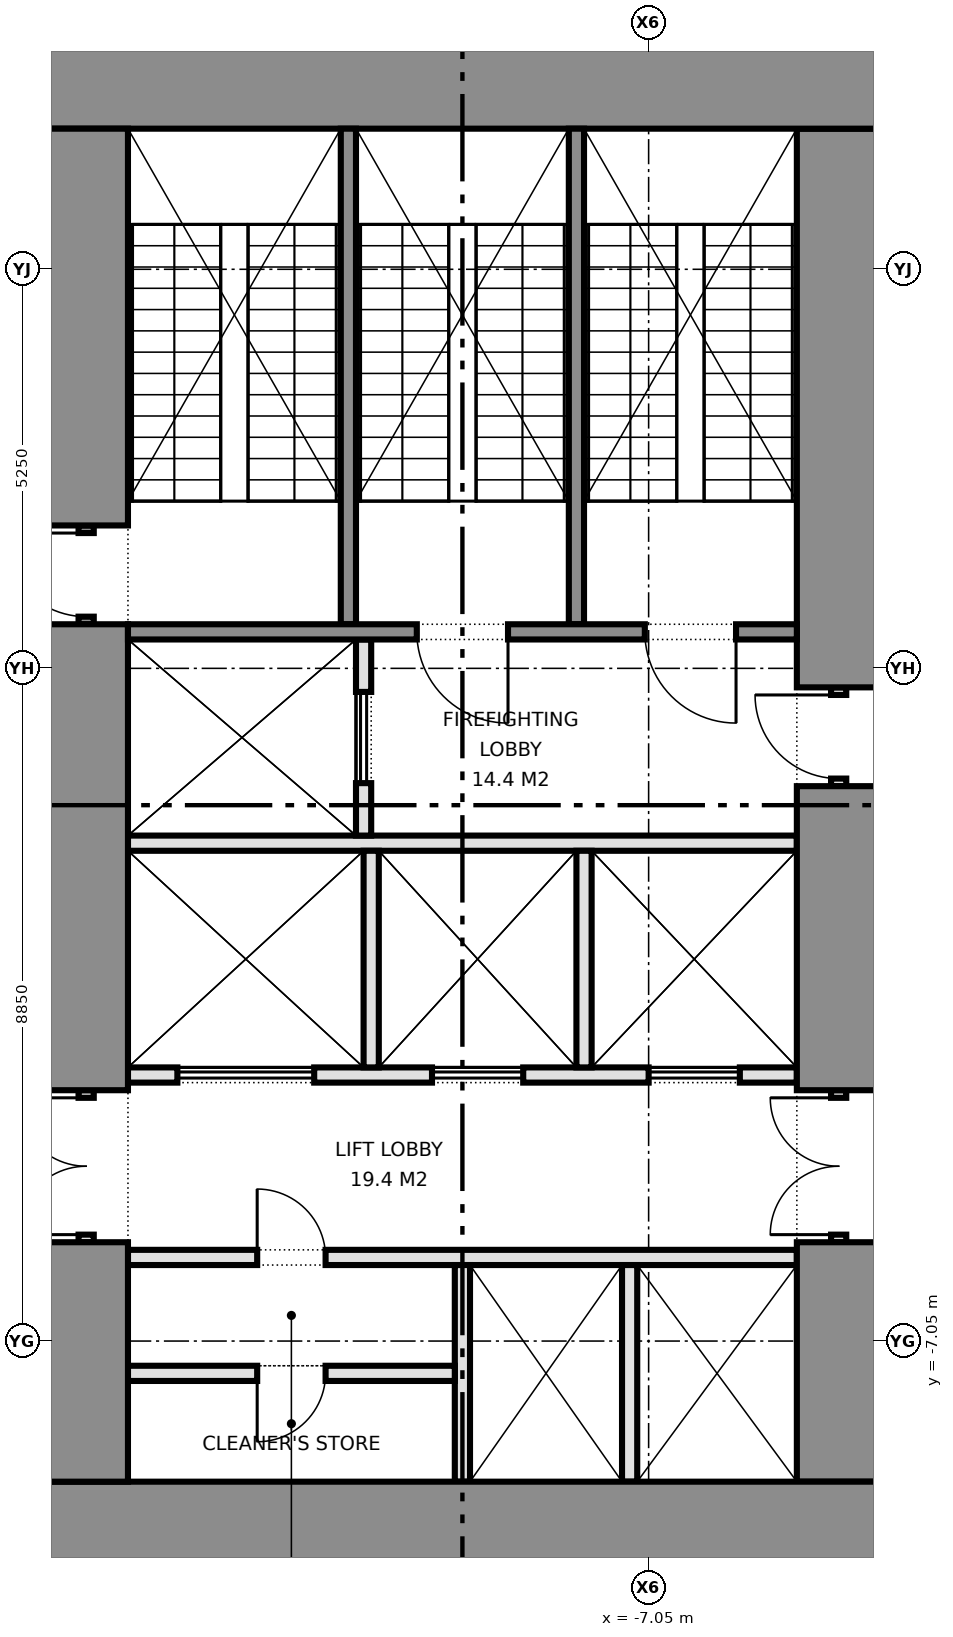
"""IFC4 building model, lengths in metres.
Left out: names, types, materials, properties, quantities, classifications, styles, units other than length and angle.
Written with IfcOpenShell. Run it as: python <this file> out.ifc"""

import sys

from ifc_helpers import new_model, si_unit, direction, frame, frame_2d, origin, place, context, subcontext, project, spatial, rectangle, extrude, element, fill, save


model = new_model("IFC4")
c1 = context("Model", 3, precision=1e-05, world=origin(), true_north=direction((0.0, 1.0)))
c2 = subcontext(c1, "Body", "Model", "MODEL_VIEW")
j1 = project(units=[si_unit("LENGTHUNIT", "METRE"), si_unit("PLANEANGLEUNIT", "RADIAN")], contexts=[c1])
p1 = place(None, origin())
s1 = spatial("IfcSite", under=j1, at=p1, CompositionType="ELEMENT")
p2 = place(p1, origin())
s2 = spatial("IfcBuilding", under=s1, at=p2, CompositionType="ELEMENT")
p3 = place(p2, frame((0.0, 0.0, 35.3)))
s3 = spatial("IfcBuildingStorey", under=s2, at=p3, CompositionType="ELEMENT", Elevation=35.3)
for number, where, z_axis, x_axis in (
    (1, (-15.0, -9.45, 0.0), (0.0, 0.0, 1.0), (1.0, 0.0, 0.0)),
    (2, (-15.0, 9.45, 0.0), (0.0, 0.0, 1.0), (1.0, 0.0, 0.0)),
):
    element("IfcWall", number, at=place(p3, frame(where, z_axis=z_axis, x_axis=x_axis)), inside=s3, PredefinedType="SHEAR", context=c2, shape_type="SweptSolid", body=[
        extrude(rectangle(XDim=11.0, YDim=1.1, at=frame_2d((5.5, 0.0))), origin(), (0.0, 0.0, 1.0), 4.575),
    ])
p4 = place(p3, frame((-14.45, -8.9, 0.0), z_axis=(0.0, 0.0, 1.0), x_axis=(0.0, 1.0, 0.0)))
e3 = element("IfcWall", 3, at=p4, inside=s3, PredefinedType="SHEAR", context=c2, shape_type="SweptSolid", body=[
    extrude(rectangle(XDim=3.15, YDim=1.1, at=frame_2d((1.575, 0.0))), origin(), (0.0, 0.0, 1.0), 4.575),
])
p5 = place(p3, frame((-14.45, -5.75, 0.0), z_axis=(0.0, 0.0, 1.0), x_axis=(0.0, 1.0, 0.0)))
e4 = element("IfcWall", 4, at=p5, inside=s3, PredefinedType="PARTITIONING", context=c2, shape_type="SweptSolid", body=[
    extrude(rectangle(XDim=2.0, YDim=0.2, at=frame_2d((1.0, 0.0))), origin(), (0.0, 0.0, 1.0), 2.4),
])
p6 = place(p5, frame((0.1, 0.0, 0.0)))
e5 = element("IfcOpeningElement", 5, at=p6, cuts=e4, PredefinedType="OPENING", context=c2, shape_type="SweptSolid", body=[
    extrude(rectangle(XDim=1.8, YDim=2.1, at=frame_2d((0.9, 1.05))), frame((0.0, 0.11, 0.0), z_axis=(0.0, -1.0, 0.0), x_axis=(1.0, 0.0, 0.0)), (0.0, 0.0, 1.0), 0.22),
])
p7 = place(p3, frame((-14.45, -3.75, 0.0), z_axis=(0.0, 0.0, 1.0), x_axis=(0.0, 1.0, 0.0)))
e6 = element("IfcWall", 6, at=p7, inside=s3, PredefinedType="SHEAR", context=c2, shape_type="SweptSolid", body=[
    extrude(rectangle(XDim=6.13, YDim=1.1, at=frame_2d((3.065, 0.0))), origin(), (0.0, 0.0, 1.0), 4.575),
])
p8 = place(p3, frame((-14.45, 2.38, 0.0), z_axis=(0.0, 0.0, 1.0), x_axis=(0.0, 1.0, 0.0)))
e7 = element("IfcWall", 7, at=p8, inside=s3, PredefinedType="SHEAR", context=c2, shape_type="SweptSolid", body=[
    extrude(rectangle(XDim=1.3, YDim=0.2, at=frame_2d((0.65, 0.0))), origin(), (0.0, 0.0, 1.0), 2.4),
])
p9 = place(p8, frame((0.1, 0.0, 0.0)))
e8 = element("IfcOpeningElement", 8, at=p9, cuts=e7, PredefinedType="OPENING", context=c2, shape_type="SweptSolid", body=[
    extrude(rectangle(XDim=1.1, YDim=2.1, at=frame_2d((0.55, 1.05))), frame((0.0, 0.11, 0.0), z_axis=(0.0, -1.0, 0.0), x_axis=(1.0, 0.0, 0.0)), (0.0, 0.0, 1.0), 0.22),
])
p10 = place(p3, frame((-14.45, 3.68, 0.0), z_axis=(0.0, 0.0, 1.0), x_axis=(0.0, 1.0, 0.0)))
e9 = element("IfcWall", 9, at=p10, inside=s3, PredefinedType="SHEAR", context=c2, shape_type="SweptSolid", body=[
    extrude(rectangle(XDim=5.22, YDim=1.1, at=frame_2d((2.61, 0.0))), origin(), (0.0, 0.0, 1.0), 4.575),
])
p11 = place(p3, frame((-4.55, -8.9, 0.0), z_axis=(0.0, 0.0, 1.0), x_axis=(0.0, 1.0, 0.0)))
e10 = element("IfcWall", 10, at=p11, inside=s3, PredefinedType="SHEAR", context=c2, shape_type="SweptSolid", body=[
    extrude(rectangle(XDim=3.15, YDim=1.1, at=frame_2d((1.575, 0.0))), origin(), (0.0, 0.0, 1.0), 4.575),
])
p12 = place(p3, frame((-4.55, -5.75, 0.0), z_axis=(0.0, 0.0, 1.0), x_axis=(0.0, 1.0, 0.0)))
e11 = element("IfcWall", 11, at=p12, inside=s3, PredefinedType="PARTITIONING", context=c2, shape_type="SweptSolid", body=[
    extrude(rectangle(XDim=2.0, YDim=0.2, at=frame_2d((1.0, 0.0))), origin(), (0.0, 0.0, 1.0), 2.4),
])
p13 = place(p12, frame((0.1, 0.0, 0.0)))
e12 = element("IfcOpeningElement", 12, at=p13, cuts=e11, PredefinedType="OPENING", context=c2, shape_type="SweptSolid", body=[
    extrude(rectangle(XDim=1.8, YDim=2.1, at=frame_2d((0.9, 1.05))), frame((0.0, 0.11, 0.0), z_axis=(0.0, -1.0, 0.0), x_axis=(1.0, 0.0, 0.0)), (0.0, 0.0, 1.0), 0.22),
])
p14 = place(p3, frame((-4.55, -3.75, 0.0), z_axis=(0.0, 0.0, 1.0), x_axis=(0.0, 1.0, 0.0)))
e13 = element("IfcWall", 13, at=p14, inside=s3, PredefinedType="SHEAR", context=c2, shape_type="SweptSolid", body=[
    extrude(rectangle(XDim=4.0, YDim=1.1, at=frame_2d((2.0, 0.0))), origin(), (0.0, 0.0, 1.0), 4.575),
])
p15 = place(p3, frame((-4.55, 0.25, 0.0), z_axis=(0.0, 0.0, 1.0), x_axis=(0.0, 1.0, 0.0)))
e14 = element("IfcWall", 14, at=p15, inside=s3, PredefinedType="PARTITIONING", context=c2, shape_type="SweptSolid", body=[
    extrude(rectangle(XDim=1.3, YDim=0.2, at=frame_2d((0.65, 0.0))), origin(), (0.0, 0.0, 1.0), 2.4),
])
p16 = place(p15, frame((0.1, 0.0, 0.0)))
e15 = element("IfcOpeningElement", 15, at=p16, cuts=e14, PredefinedType="OPENING", context=c2, shape_type="SweptSolid", body=[
    extrude(rectangle(XDim=1.1, YDim=2.1, at=frame_2d((0.55, 1.05))), frame((0.0, 0.11, 0.0), z_axis=(0.0, -1.0, 0.0), x_axis=(1.0, 0.0, 0.0)), (0.0, 0.0, 1.0), 0.22),
])
p17 = place(p3, frame((-4.55, 1.55, 0.0), z_axis=(0.0, 0.0, 1.0), x_axis=(0.0, 1.0, 0.0)))
e16 = element("IfcWall", 16, at=p17, inside=s3, PredefinedType="SHEAR", context=c2, shape_type="SweptSolid", body=[
    extrude(rectangle(XDim=7.35, YDim=1.1, at=frame_2d((3.675, 0.0))), origin(), (0.0, 0.0, 1.0), 4.575),
])
p18 = place(p3, frame((-13.9, -5.95, 0.0), z_axis=(0.0, 0.0, 1.0), x_axis=(1.0, 0.0, 0.0)))
e17 = element("IfcWall", 17, at=p18, inside=s3, PredefinedType="PARTITIONING", context=c2, shape_type="SweptSolid", body=[
    extrude(rectangle(XDim=8.8, YDim=0.2, at=frame_2d((4.4, 0.0))), origin(), (0.0, 0.0, 1.0), 4.575),
])
p19 = place(p18, frame((1.7, 0.0, 0.0)))
e18 = element("IfcOpeningElement", 18, at=p19, cuts=e17, PredefinedType="OPENING", context=c2, shape_type="SweptSolid", body=[
    extrude(rectangle(XDim=0.9, YDim=2.1, at=frame_2d((0.45, 1.05))), frame((0.0, 0.11, 0.0), z_axis=(0.0, -1.0, 0.0), x_axis=(1.0, 0.0, 0.0)), (0.0, 0.0, 1.0), 0.22),
])
p20 = place(p3, frame((-13.9, -3.55, 0.0), z_axis=(0.0, 0.0, 1.0), x_axis=(1.0, 0.0, 0.0)))
e19 = element("IfcWall", 19, at=p20, inside=s3, PredefinedType="PARTITIONING", context=c2, shape_type="SweptSolid", body=[
    extrude(rectangle(XDim=8.8, YDim=0.2, at=frame_2d((4.4, 0.0))), origin(), (0.0, 0.0, 1.0), 4.575),
])
p21 = place(p20, frame((0.65, 0.0, 0.0)))
e20 = element("IfcOpeningElement", 20, at=p21, cuts=e19, PredefinedType="OPENING", context=c2, shape_type="SweptSolid", body=[
    extrude(rectangle(XDim=1.8, YDim=2.1, at=frame_2d((0.9, 1.05))), frame((0.0, 0.11, 0.0), z_axis=(0.0, -1.0, 0.0), x_axis=(1.0, 0.0, 0.0)), (0.0, 0.0, 1.0), 0.22),
])
p22 = place(p20, frame((4.0, 0.0, 0.0)))
e21 = element("IfcOpeningElement", 21, at=p22, cuts=e19, PredefinedType="OPENING", context=c2, shape_type="SweptSolid", body=[
    extrude(rectangle(XDim=1.2, YDim=2.1, at=frame_2d((0.6, 1.05))), frame((0.0, 0.11, 0.0), z_axis=(0.0, -1.0, 0.0), x_axis=(1.0, 0.0, 0.0)), (0.0, 0.0, 1.0), 0.22),
])
p23 = place(p20, frame((6.85, 0.0, 0.0)))
e22 = element("IfcOpeningElement", 22, at=p23, cuts=e19, PredefinedType="OPENING", context=c2, shape_type="SweptSolid", body=[
    extrude(rectangle(XDim=1.2, YDim=2.1, at=frame_2d((0.6, 1.05))), frame((0.0, 0.11, 0.0), z_axis=(0.0, -1.0, 0.0), x_axis=(1.0, 0.0, 0.0)), (0.0, 0.0, 1.0), 0.22),
])
p24 = place(p3, frame((-13.9, -0.5, 0.0), z_axis=(0.0, 0.0, 1.0), x_axis=(1.0, 0.0, 0.0)))
e23 = element("IfcWall", 23, at=p24, inside=s3, PredefinedType="PARTITIONING", context=c2, shape_type="SweptSolid", body=[
    extrude(rectangle(XDim=8.8, YDim=0.2, at=frame_2d((4.4, 0.0))), origin(), (0.0, 0.0, 1.0), 4.575),
])
p25 = place(p3, frame((-10.8, -0.4, 0.0), z_axis=(0.0, 0.0, 1.0), x_axis=(0.0, 1.0, 0.0)))
e24 = element("IfcWall", 24, at=p25, inside=s3, PredefinedType="PARTITIONING", context=c2, shape_type="SweptSolid", body=[
    extrude(rectangle(XDim=2.58, YDim=0.2, at=frame_2d((1.29, 0.0))), origin(), (0.0, 0.0, 1.0), 4.575),
])
p26 = place(p25, frame((0.69, 0.0, 0.0)))
e25 = element("IfcOpeningElement", 25, at=p26, cuts=e24, PredefinedType="OPENING", context=c2, shape_type="SweptSolid", body=[
    extrude(rectangle(XDim=1.2, YDim=2.1, at=frame_2d((0.6, 1.05))), frame((0.0, 0.11, 0.0), z_axis=(0.0, -1.0, 0.0), x_axis=(1.0, 0.0, 0.0)), (0.0, 0.0, 1.0), 0.22),
])
p27 = place(p3, frame((-13.9, 2.28, 0.0), z_axis=(0.0, 0.0, 1.0), x_axis=(1.0, 0.0, 0.0)))
e26 = element("IfcWall", 26, at=p27, inside=s3, PredefinedType="SHEAR", context=c2, shape_type="SweptSolid", body=[
    extrude(rectangle(XDim=8.8, YDim=0.2, at=frame_2d((4.4, 0.0))), origin(), (0.0, 0.0, 1.0), 4.575),
])
p28 = place(p27, frame((3.8, 0.0, 0.0)))
e27 = element("IfcOpeningElement", 27, at=p28, cuts=e26, PredefinedType="OPENING", context=c2, shape_type="SweptSolid", body=[
    extrude(rectangle(XDim=1.2, YDim=2.1, at=frame_2d((0.6, 1.05))), frame((0.0, 0.11, 0.0), z_axis=(0.0, -1.0, 0.0), x_axis=(1.0, 0.0, 0.0)), (0.0, 0.0, 1.0), 0.22),
])
p29 = place(p27, frame((6.8, 0.0, 0.0)))
e28 = element("IfcOpeningElement", 28, at=p29, cuts=e26, PredefinedType="OPENING", context=c2, shape_type="SweptSolid", body=[
    extrude(rectangle(XDim=1.2, YDim=2.1, at=frame_2d((0.6, 1.05))), frame((0.0, 0.11, 0.0), z_axis=(0.0, -1.0, 0.0), x_axis=(1.0, 0.0, 0.0)), (0.0, 0.0, 1.0), 0.22),
])
for number, where, z_axis, x_axis in (
    (29, (-11.0, 2.38, 0.0), (0.0, 0.0, 1.0), (0.0, 1.0, 0.0)),
    (30, (-8.0, 2.38, 0.0), (0.0, 0.0, 1.0), (0.0, 1.0, 0.0)),
):
    element("IfcWall", number, at=place(p3, frame(where, z_axis=z_axis, x_axis=x_axis)), inside=s3, PredefinedType="SHEAR", context=c2, shape_type="SweptSolid", body=[
        extrude(rectangle(XDim=6.52, YDim=0.2, at=frame_2d((3.26, 0.0))), origin(), (0.0, 0.0, 1.0), 4.575),
    ])
for number, where, z_axis, x_axis in (
    (31, (-9.5, -8.9, 0.0), (0.0, 0.0, 1.0), (0.0, 1.0, 0.0)),
    (32, (-7.3, -8.9, 0.0), (0.0, 0.0, 1.0), (0.0, 1.0, 0.0)),
):
    element("IfcWall", number, at=place(p3, frame(where, z_axis=z_axis, x_axis=x_axis)), inside=s3, PredefinedType="PARTITIONING", context=c2, shape_type="SweptSolid", body=[
        extrude(rectangle(XDim=2.85, YDim=0.2, at=frame_2d((1.425, 0.0))), origin(), (0.0, 0.0, 1.0), 4.575),
    ])
p30 = place(p3, frame((-13.9, -7.475, 0.0), z_axis=(0.0, 0.0, 1.0), x_axis=(1.0, 0.0, 0.0)))
e33 = element("IfcWall", 33, at=p30, inside=s3, PredefinedType="PARTITIONING", context=c2, shape_type="SweptSolid", body=[
    extrude(rectangle(XDim=4.3, YDim=0.2, at=frame_2d((2.15, 0.0))), origin(), (0.0, 0.0, 1.0), 4.575),
])
p31 = place(p30, frame((1.7, 0.0, 0.0)))
e34 = element("IfcOpeningElement", 34, at=p31, cuts=e33, PredefinedType="OPENING", context=c2, shape_type="SweptSolid", body=[
    extrude(rectangle(XDim=0.9, YDim=2.1, at=frame_2d((0.45, 1.05))), frame((0.0, 0.11, 0.0), z_axis=(0.0, -1.0, 0.0), x_axis=(1.0, 0.0, 0.0)), (0.0, 0.0, 1.0), 0.22),
])
for number, where, z_axis, x_axis in (
    (35, (-10.7, -3.45, 0.0), (0.0, 0.0, 1.0), (0.0, 1.0, 0.0)),
    (36, (-7.9, -3.45, 0.0), (0.0, 0.0, 1.0), (0.0, 1.0, 0.0)),
):
    element("IfcWall", number, at=place(p3, frame(where, z_axis=z_axis, x_axis=x_axis)), inside=s3, PredefinedType="PARTITIONING", context=c2, shape_type="SweptSolid", body=[
        extrude(rectangle(XDim=2.85, YDim=0.2, at=frame_2d((1.425, 0.0))), origin(), (0.0, 0.0, 1.0), 4.575),
    ])
p32 = place(p6, origin())
e37 = element("IfcDoor", 37, at=p32, inside=s3, OperationType="DOUBLE_DOOR_SINGLE_SWING", PredefinedType="DOOR", context=c2, shape_type="SweptSolid", body=[
    extrude(rectangle(XDim=1.8, YDim=2.1, at=frame_2d((0.9, 1.05))), frame((0.0, 0.025, 0.0), z_axis=(0.0, -1.0, 0.0), x_axis=(1.0, 0.0, 0.0)), (0.0, 0.0, 1.0), 0.05),
])
fill(e5, e37)
p33 = place(p9, origin())
e38 = element("IfcDoor", 38, at=p33, inside=s3, OperationType="SINGLE_SWING_RIGHT", PredefinedType="DOOR", context=c2, shape_type="SweptSolid", body=[
    extrude(rectangle(XDim=1.1, YDim=2.1, at=frame_2d((0.55, 1.05))), frame((0.0, 0.025, 0.0), z_axis=(0.0, -1.0, 0.0), x_axis=(1.0, 0.0, 0.0)), (0.0, 0.0, 1.0), 0.05),
])
fill(e8, e38)
p34 = place(p13, origin())
e39 = element("IfcDoor", 39, at=p34, inside=s3, OperationType="DOUBLE_DOOR_SINGLE_SWING", PredefinedType="DOOR", context=c2, shape_type="SweptSolid", body=[
    extrude(rectangle(XDim=1.8, YDim=2.1, at=frame_2d((0.9, 1.05))), frame((0.0, 0.025, 0.0), z_axis=(0.0, -1.0, 0.0), x_axis=(1.0, 0.0, 0.0)), (0.0, 0.0, 1.0), 0.05),
])
fill(e12, e39)
p35 = place(p16, origin())
e40 = element("IfcDoor", 40, at=p35, inside=s3, OperationType="SINGLE_SWING_RIGHT", PredefinedType="DOOR", context=c2, shape_type="SweptSolid", body=[
    extrude(rectangle(XDim=1.1, YDim=2.1, at=frame_2d((0.55, 1.05))), frame((0.0, 0.025, 0.0), z_axis=(0.0, -1.0, 0.0), x_axis=(1.0, 0.0, 0.0)), (0.0, 0.0, 1.0), 0.05),
])
fill(e15, e40)
p36 = place(p21, origin())
e41 = element("IfcDoor", 41, at=p36, inside=s3, OperationType="DOUBLE_DOOR_SLIDING", PredefinedType="DOOR", context=c2, shape_type="SweptSolid", body=[
    extrude(rectangle(XDim=1.8, YDim=2.1, at=frame_2d((0.9, 1.05))), frame((0.0, 0.025, 0.0), z_axis=(0.0, -1.0, 0.0), x_axis=(1.0, 0.0, 0.0)), (0.0, 0.0, 1.0), 0.05),
])
fill(e20, e41)
p37 = place(p22, origin())
e42 = element("IfcDoor", 42, at=p37, inside=s3, OperationType="DOUBLE_DOOR_SLIDING", PredefinedType="DOOR", context=c2, shape_type="SweptSolid", body=[
    extrude(rectangle(XDim=1.2, YDim=2.1, at=frame_2d((0.6, 1.05))), frame((0.0, 0.025, 0.0), z_axis=(0.0, -1.0, 0.0), x_axis=(1.0, 0.0, 0.0)), (0.0, 0.0, 1.0), 0.05),
])
fill(e21, e42)
p38 = place(p23, origin())
e43 = element("IfcDoor", 43, at=p38, inside=s3, OperationType="DOUBLE_DOOR_SLIDING", PredefinedType="DOOR", context=c2, shape_type="SweptSolid", body=[
    extrude(rectangle(XDim=1.2, YDim=2.1, at=frame_2d((0.6, 1.05))), frame((0.0, 0.025, 0.0), z_axis=(0.0, -1.0, 0.0), x_axis=(1.0, 0.0, 0.0)), (0.0, 0.0, 1.0), 0.05),
])
fill(e22, e43)
p39 = place(p26, origin())
e44 = element("IfcDoor", 44, at=p39, inside=s3, OperationType="DOUBLE_DOOR_SLIDING", PredefinedType="DOOR", context=c2, shape_type="SweptSolid", body=[
    extrude(rectangle(XDim=1.2, YDim=2.1, at=frame_2d((0.6, 1.05))), frame((0.0, 0.025, 0.0), z_axis=(0.0, -1.0, 0.0), x_axis=(1.0, 0.0, 0.0)), (0.0, 0.0, 1.0), 0.05),
])
fill(e25, e44)
p40 = place(p19, origin())
e45 = element("IfcDoor", 45, at=p40, inside=s3, OperationType="SINGLE_SWING_LEFT", PredefinedType="DOOR", context=c2, shape_type="SweptSolid", body=[
    extrude(rectangle(XDim=0.9, YDim=2.1, at=frame_2d((0.45, 1.05))), frame((0.0, 0.025, 0.0), z_axis=(0.0, -1.0, 0.0), x_axis=(1.0, 0.0, 0.0)), (0.0, 0.0, 1.0), 0.05),
])
fill(e18, e45)
p41 = place(p31, frame((0.9, 0.0, 0.0), z_axis=(0.0, 0.0, 1.0), x_axis=(-1.0, 0.0, 0.0)))
e46 = element("IfcDoor", 46, at=p41, inside=s3, OperationType="SINGLE_SWING_RIGHT", PredefinedType="DOOR", context=c2, shape_type="SweptSolid", body=[
    extrude(rectangle(XDim=0.9, YDim=2.1, at=frame_2d((0.45, 1.05))), frame((0.0, 0.025, 0.0), z_axis=(0.0, -1.0, 0.0), x_axis=(1.0, 0.0, 0.0)), (0.0, 0.0, 1.0), 0.05),
])
fill(e34, e46)
p42 = place(p28, frame((1.2, 0.0, 0.0), z_axis=(0.0, 0.0, 1.0), x_axis=(-1.0, 0.0, 0.0)))
e47 = element("IfcDoor", 47, at=p42, inside=s3, OperationType="SINGLE_SWING_LEFT", PredefinedType="DOOR", context=c2, shape_type="SweptSolid", body=[
    extrude(rectangle(XDim=1.2, YDim=2.1, at=frame_2d((0.6, 1.05))), frame((0.0, 0.025, 0.0), z_axis=(0.0, -1.0, 0.0), x_axis=(1.0, 0.0, 0.0)), (0.0, 0.0, 1.0), 0.05),
])
fill(e27, e47)
p43 = place(p29, frame((1.2, 0.0, 0.0), z_axis=(0.0, 0.0, 1.0), x_axis=(-1.0, 0.0, 0.0)))
e48 = element("IfcDoor", 48, at=p43, inside=s3, OperationType="SINGLE_SWING_LEFT", PredefinedType="DOOR", context=c2, shape_type="SweptSolid", body=[
    extrude(rectangle(XDim=1.2, YDim=2.1, at=frame_2d((0.6, 1.05))), frame((0.0, 0.025, 0.0), z_axis=(0.0, -1.0, 0.0), x_axis=(1.0, 0.0, 0.0)), (0.0, 0.0, 1.0), 0.05),
])
fill(e28, e48)
save(model, sys.argv[1])
